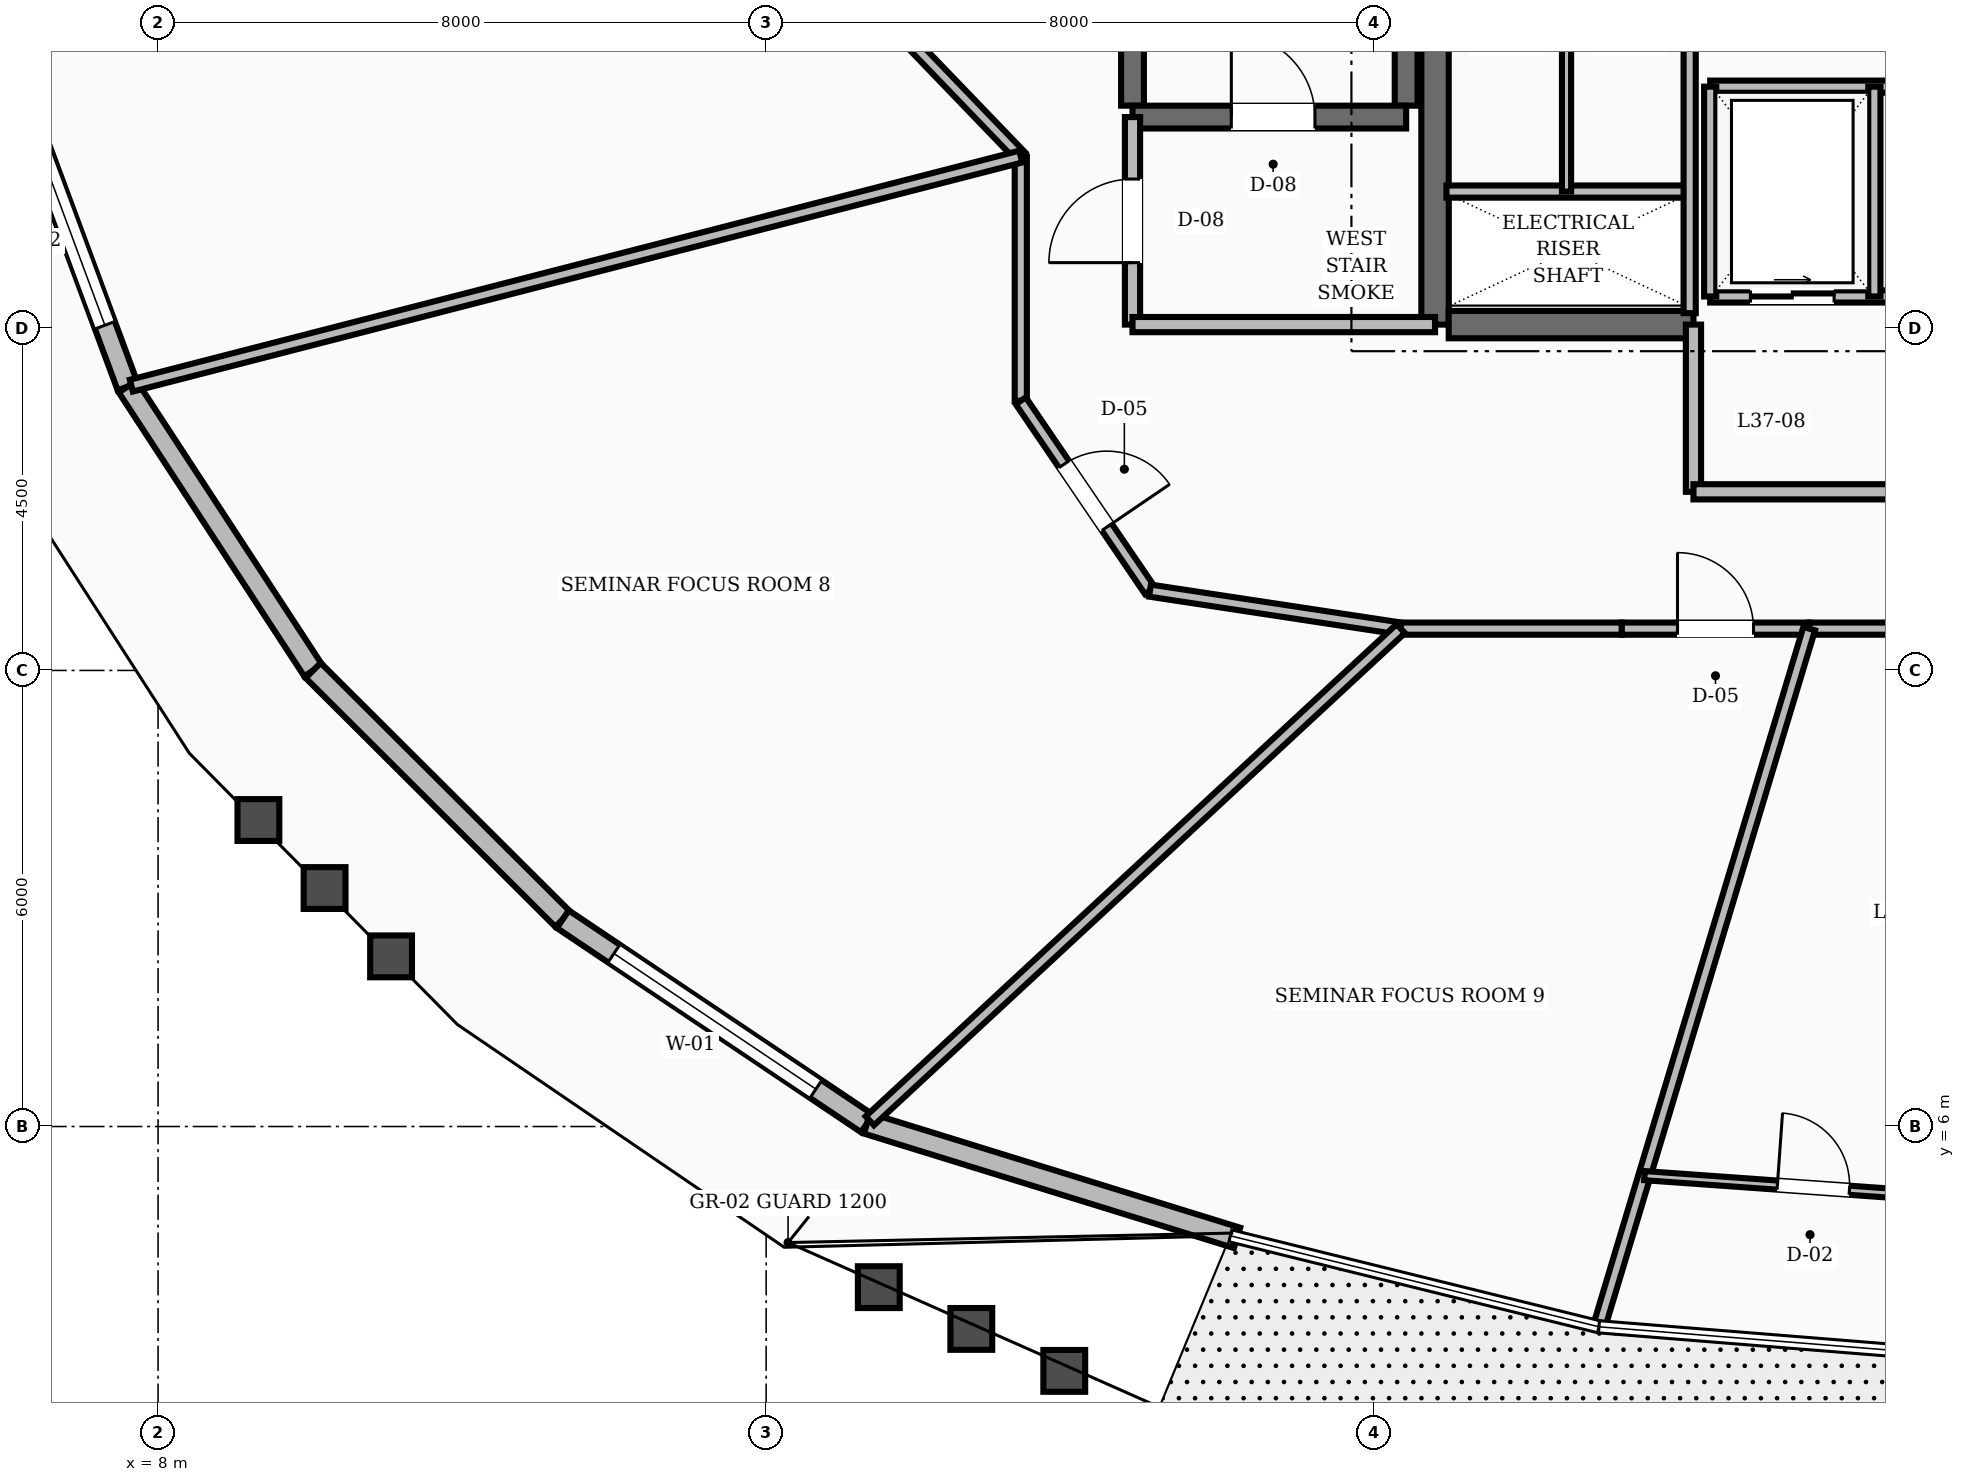
"""IFC4 building model, lengths in metres.
Left out: names, types, materials, properties, quantities, classifications, styles, units other than length and angle.
Written with IfcOpenShell. Run it as: python <this file> out.ifc"""

import sys

from ifc_helpers import new_model, si_unit, direction, frame, frame_2d, origin, place, context, subcontext, project, spatial, rectangle, extrude, element, fill, save


model = new_model("IFC4")
c1 = context("Model", 3, precision=1e-05, world=origin(), true_north=direction((0.0, 1.0)))
c2 = subcontext(c1, "Body", "Model", "MODEL_VIEW")
j1 = project(units=[si_unit("LENGTHUNIT", "METRE"), si_unit("PLANEANGLEUNIT", "RADIAN")], contexts=[c1])
p1 = place(None, origin())
s1 = spatial("IfcSite", under=j1, at=p1, CompositionType="ELEMENT")
p2 = place(p1, origin())
s2 = spatial("IfcBuilding", under=s1, at=p2, CompositionType="ELEMENT")
p3 = place(p2, frame((0.0, 0.0, 146.0)))
s3 = spatial("IfcBuildingStorey", under=s2, at=p3, CompositionType="ELEMENT", Elevation=146.0)
p4 = place(p3, frame((24.8, 16.55, 0.0), z_axis=(0.0, 0.0, 1.0), x_axis=(0.0, 1.0, 0.0)))
e1 = element("IfcWall", 1, at=p4, inside=s3, PredefinedType="SHEAR", context=c2, shape_type="SweptSolid", body=[
    extrude(rectangle(XDim=6.3, YDim=0.36, at=frame_2d((3.15, 0.0))), origin(), (0.0, 0.0, 1.0), 3.6),
])
p5 = place(p3, frame((24.98, 16.55, 0.0), z_axis=(0.0, 0.0, 1.0), x_axis=(1.0, 0.0, 0.0)))
e2 = element("IfcWall", 2, at=p5, inside=s3, PredefinedType="SHEAR", context=c2, shape_type="SweptSolid", body=[
    extrude(rectangle(XDim=3.22, YDim=0.36, at=frame_2d((1.61, 0.0))), origin(), (0.0, 0.0, 1.0), 3.6),
])
for number, where, z_axis, x_axis in (
    (3, (20.82, 19.43, 0.0), (0.0, 0.0, 1.0), (0.0, 1.0, 0.0)),
    (4, (24.42, 19.43, 0.0), (0.0, 0.0, 1.0), (0.0, 1.0, 0.0)),
):
    element("IfcWall", number, at=place(p3, frame(where, z_axis=z_axis, x_axis=x_axis)), inside=s3, PredefinedType="SHEAR", context=c2, shape_type="SweptSolid", body=[
        extrude(rectangle(XDim=8.74, YDim=0.3, at=frame_2d((4.37, 0.0))), origin(), (0.0, 0.0, 1.0), 3.6),
    ])
p6 = place(p3, frame((20.82, 19.28, 0.0), z_axis=(0.0, 0.0, 1.0), x_axis=(1.0, 0.0, 0.0)))
e5 = element("IfcWall", 5, at=p6, inside=s3, PredefinedType="SHEAR", context=c2, shape_type="SweptSolid", body=[
    extrude(rectangle(XDim=3.6, YDim=0.3, at=frame_2d((1.8, 0.0))), origin(), (0.0, 0.0, 1.0), 3.6),
])
p7 = place(p6, frame((1.3, 0.0, 0.0)))
e6 = element("IfcOpeningElement", 6, at=p7, cuts=e5, PredefinedType="OPENING", context=c2, shape_type="SweptSolid", body=[
    extrude(rectangle(XDim=1.1, YDim=2.1, at=frame_2d((0.55, 1.05))), frame((0.0, 0.16, 0.0), z_axis=(0.0, -1.0, 0.0), x_axis=(1.0, 0.0, 0.0)), (0.0, 0.0, 1.0), 0.32),
])
p8 = place(p3, frame((6.097, 19.786, 0.0), z_axis=(0.0, 0.0, 1.0), x_axis=(0.347777987911, -0.937576914778, 0.0)))
e7 = element("IfcWall", 7, at=p8, inside=s3, PredefinedType="STANDARD", context=c2, shape_type="SweptSolid", body=[
    extrude(rectangle(XDim=4.322, YDim=0.28, at=frame_2d((2.161, 0.0))), origin(), (0.0, 0.0, 1.0), 2.82),
])
p9 = place(p8, frame((0.861, 0.0, 0.8)))
e8 = element("IfcOpeningElement", 8, at=p9, cuts=e7, PredefinedType="OPENING", context=c2, shape_type="SweptSolid", body=[
    extrude(rectangle(XDim=2.6, YDim=1.65, at=frame_2d((1.3, 0.825))), frame((0.0, 0.15, 0.0), z_axis=(0.0, -1.0, 0.0), x_axis=(1.0, 0.0, 0.0)), (0.0, 0.0, 1.0), 0.3),
])
p10 = place(p3, frame((7.6, 15.734, 0.0), z_axis=(0.0, 0.0, 1.0), x_axis=(0.547087162156, -0.837075645927, 0.0)))
e9 = element("IfcWall", 9, at=p10, inside=s3, PredefinedType="STANDARD", context=c2, shape_type="SweptSolid", body=[
    extrude(rectangle(XDim=4.461, YDim=0.28, at=frame_2d((2.23, 0.0))), origin(), (0.0, 0.0, 1.0), 2.82),
])
p11 = place(p3, frame((10.041, 12.0, 0.0), z_axis=(0.0, 0.0, 1.0), x_axis=(0.708343047993, -0.70586834917, 0.0)))
e10 = element("IfcWall", 10, at=p11, inside=s3, PredefinedType="STANDARD", context=c2, shape_type="SweptSolid", body=[
    extrude(rectangle(XDim=4.637, YDim=0.28, at=frame_2d((2.318, 0.0))), origin(), (0.0, 0.0, 1.0), 2.82),
])
p12 = place(p3, frame((13.325, 8.727, 0.0), z_axis=(0.0, 0.0, 1.0), x_axis=(0.830308520581, -0.557304010977, 0.0)))
e11 = element("IfcWall", 11, at=p12, inside=s3, PredefinedType="STANDARD", context=c2, shape_type="SweptSolid", body=[
    extrude(rectangle(XDim=4.82, YDim=0.28, at=frame_2d((2.41, 0.0))), origin(), (0.0, 0.0, 1.0), 2.82),
])
p13 = place(p12, frame((0.81, 0.0, 0.8)))
e12 = element("IfcOpeningElement", 12, at=p13, cuts=e11, PredefinedType="OPENING", context=c2, shape_type="SweptSolid", body=[
    extrude(rectangle(XDim=3.2, YDim=1.65, at=frame_2d((1.6, 0.825))), frame((0.0, 0.15, 0.0), z_axis=(0.0, -1.0, 0.0), x_axis=(1.0, 0.0, 0.0)), (0.0, 0.0, 1.0), 0.3),
])
p14 = place(p3, frame((17.327, 6.041, 0.0), z_axis=(0.0, 0.0, 1.0), x_axis=(0.955338718449, -0.295512999769, 0.0)))
e13 = element("IfcWall", 13, at=p14, inside=s3, PredefinedType="STANDARD", context=c2, shape_type="SweptSolid", body=[
    extrude(rectangle(XDim=5.096, YDim=0.28, at=frame_2d((2.548, 0.0))), origin(), (0.0, 0.0, 1.0), 2.82),
])
p15 = place(p3, frame((20.82, 16.55, 0.0), z_axis=(0.0, 0.0, 1.0), x_axis=(0.0, 1.0, 0.0)))
e14 = element("IfcWall", 14, at=p15, inside=s3, PredefinedType="SOLIDWALL", context=c2, shape_type="SweptSolid", body=[
    extrude(rectangle(XDim=2.73, YDim=0.2, at=frame_2d((1.365, 0.0))), origin(), (0.0, 0.0, 1.0), 2.8),
])
p16 = place(p15, frame((0.815, 0.0, 0.0)))
e15 = element("IfcOpeningElement", 15, at=p16, cuts=e14, PredefinedType="OPENING", context=c2, shape_type="SweptSolid", body=[
    extrude(rectangle(XDim=1.1, YDim=2.1, at=frame_2d((0.55, 1.05))), frame((0.0, 0.11, 0.0), z_axis=(0.0, -1.0, 0.0), x_axis=(1.0, 0.0, 0.0)), (0.0, 0.0, 1.0), 0.22),
])
p17 = place(p3, frame((20.82, 16.55, 0.0), z_axis=(0.0, 0.0, 1.0), x_axis=(1.0, 0.0, 0.0)))
e16 = element("IfcWall", 16, at=p17, inside=s3, PredefinedType="SOLIDWALL", context=c2, shape_type="SweptSolid", body=[
    extrude(rectangle(XDim=3.98, YDim=0.2, at=frame_2d((1.99, 0.0))), origin(), (0.0, 0.0, 1.0), 2.8),
])
p18 = place(p3, frame((28.2, 14.35, 0.0), z_axis=(0.0, 0.0, 1.0), x_axis=(0.0, 1.0, 0.0)))
e17 = element("IfcWall", 17, at=p18, inside=s3, PredefinedType="SOLIDWALL", context=c2, shape_type="SweptSolid", body=[
    extrude(rectangle(XDim=2.2, YDim=0.2, at=frame_2d((1.1, 0.0))), origin(), (0.0, 0.0, 1.0), 2.8),
])
p19 = place(p3, frame((28.2, 14.35, 0.0), z_axis=(0.0, 0.0, 1.0), x_axis=(1.0, 0.0, 0.0)))
e18 = element("IfcWall", 18, at=p19, inside=s3, PredefinedType="SOLIDWALL", context=c2, shape_type="SweptSolid", body=[
    extrude(rectangle(XDim=7.6, YDim=0.2, at=frame_2d((3.8, 0.0))), origin(), (0.0, 0.0, 1.0), 2.8),
])
p20 = place(p19, frame((3.2, 0.0, 0.0)))
e19 = element("IfcOpeningElement", 19, at=p20, cuts=e18, PredefinedType="OPENING", context=c2, shape_type="SweptSolid", body=[
    extrude(rectangle(XDim=1.2, YDim=2.1, at=frame_2d((0.6, 1.05))), frame((0.0, 0.11, 0.0), z_axis=(0.0, -1.0, 0.0), x_axis=(1.0, 0.0, 0.0)), (0.0, 0.0, 1.0), 0.22),
])
p21 = place(p3, frame((28.42, 16.92, 0.0), z_axis=(0.0, 0.0, 1.0), x_axis=(1.0, 0.0, 0.0)))
e20 = element("IfcWall", 20, at=p21, inside=s3, PredefinedType="SOLIDWALL", context=c2, shape_type="SweptSolid", body=[
    extrude(rectangle(XDim=7.16, YDim=0.16, at=frame_2d((3.58, 0.0))), origin(), (0.0, 0.0, 1.0), 2.8),
])
p22 = place(p21, frame((0.53, 0.0, 0.0)))
e21 = element("IfcOpeningElement", 21, at=p22, cuts=e20, PredefinedType="OPENING", context=c2, shape_type="SweptSolid", body=[
    extrude(rectangle(XDim=1.1, YDim=2.15, at=frame_2d((0.55, 1.075))), frame((0.0, 0.09, 0.0), z_axis=(0.0, -1.0, 0.0), x_axis=(1.0, 0.0, 0.0)), (0.0, 0.0, 1.0), 0.18),
])
p23 = place(p21, frame((3.03, 0.0, 0.0)))
e22 = element("IfcOpeningElement", 22, at=p23, cuts=e20, PredefinedType="OPENING", context=c2, shape_type="SweptSolid", body=[
    extrude(rectangle(XDim=1.1, YDim=2.15, at=frame_2d((0.55, 1.075))), frame((0.0, 0.09, 0.0), z_axis=(0.0, -1.0, 0.0), x_axis=(1.0, 0.0, 0.0)), (0.0, 0.0, 1.0), 0.18),
])
p24 = place(p21, frame((5.53, 0.0, 0.0)))
e23 = element("IfcOpeningElement", 23, at=p24, cuts=e20, PredefinedType="OPENING", context=c2, shape_type="SweptSolid", body=[
    extrude(rectangle(XDim=1.1, YDim=2.15, at=frame_2d((0.55, 1.075))), frame((0.0, 0.09, 0.0), z_axis=(0.0, -1.0, 0.0), x_axis=(1.0, 0.0, 0.0)), (0.0, 0.0, 1.0), 0.18),
])
p25 = place(p3, frame((28.42, 19.68, 0.0), z_axis=(0.0, 0.0, 1.0), x_axis=(1.0, 0.0, 0.0)))
e24 = element("IfcWall", 24, at=p25, inside=s3, PredefinedType="SOLIDWALL", context=c2, shape_type="SweptSolid", body=[
    extrude(rectangle(XDim=7.16, YDim=0.16, at=frame_2d((3.58, 0.0))), origin(), (0.0, 0.0, 1.0), 2.8),
])
for number, where, z_axis, x_axis in (
    (25, (28.42, 16.92, 0.0), (0.0, 0.0, 1.0), (0.0, 1.0, 0.0)),
    (26, (30.58, 16.92, 0.0), (0.0, 0.0, 1.0), (0.0, 1.0, 0.0)),
):
    element("IfcWall", number, at=place(p3, frame(where, z_axis=z_axis, x_axis=x_axis)), inside=s3, PredefinedType="SOLIDWALL", context=c2, shape_type="SweptSolid", body=[
        extrude(rectangle(XDim=2.76, YDim=0.16, at=frame_2d((1.38, 0.0))), origin(), (0.0, 0.0, 1.0), 2.8),
    ])
p26 = place(p3, frame((24.95, 18.3, 0.0), z_axis=(0.0, 0.0, 1.0), x_axis=(1.0, 0.0, 0.0)))
e27 = element("IfcWall", 27, at=p26, inside=s3, PredefinedType="SOLIDWALL", context=c2, shape_type="SweptSolid", body=[
    extrude(rectangle(XDim=3.2, YDim=0.16, at=frame_2d((1.6, 0.0))), origin(), (0.0, 0.0, 1.0), 2.8),
])
p27 = place(p3, frame((28.15, 16.7, 0.0), z_axis=(0.0, 0.0, 1.0), x_axis=(0.0, 1.0, 0.0)))
e28 = element("IfcWall", 28, at=p27, inside=s3, PredefinedType="SOLIDWALL", context=c2, shape_type="SweptSolid", body=[
    extrude(rectangle(XDim=6.05, YDim=0.16, at=frame_2d((3.025, 0.0))), origin(), (0.0, 0.0, 1.0), 2.8),
])
p28 = place(p3, frame((26.53, 18.3, 0.0), z_axis=(0.0, 0.0, 1.0), x_axis=(0.0, 1.0, 0.0)))
e29 = element("IfcWall", 29, at=p28, inside=s3, PredefinedType="PARTITIONING", context=c2, shape_type="SweptSolid", body=[
    extrude(rectangle(XDim=4.45, YDim=0.12, at=frame_2d((2.225, 0.0))), origin(), (0.0, 0.0, 1.0), 2.8),
])
p29 = place(p3, frame((17.15, 21.046, 0.0), z_axis=(0.0, 0.0, 1.0), x_axis=(0.693473090138, -0.72048252807, 0.0)))
e30 = element("IfcWall", 30, at=p29, inside=s3, PredefinedType="SOLIDWALL", context=c2, shape_type="SweptSolid", body=[
    extrude(rectangle(XDim=3.173, YDim=0.16, at=frame_2d((1.586, 0.0))), origin(), (0.0, 0.0, 1.0), 2.8),
])
p30 = place(p3, frame((19.35, 18.76, 0.0), z_axis=(0.0, 0.0, 1.0), x_axis=(0.0, -1.0, 0.0)))
e31 = element("IfcWall", 31, at=p30, inside=s3, PredefinedType="SOLIDWALL", context=c2, shape_type="SweptSolid", body=[
    extrude(rectangle(XDim=3.213, YDim=0.16, at=frame_2d((1.606, 0.0))), origin(), (0.0, 0.0, 1.0), 2.8),
])
p31 = place(p3, frame((19.35, 15.548, 0.0), z_axis=(0.0, 0.0, 1.0), x_axis=(0.562674669208, -0.826678423955, 0.0)))
e32 = element("IfcWall", 32, at=p31, inside=s3, PredefinedType="SOLIDWALL", context=c2, shape_type="SweptSolid", body=[
    extrude(rectangle(XDim=3.021, YDim=0.16, at=frame_2d((1.511, 0.0))), origin(), (0.0, 0.0, 1.0), 2.8),
])
p32 = place(p31, frame((1.01, 0.0, 0.0)))
e33 = element("IfcOpeningElement", 33, at=p32, cuts=e32, PredefinedType="OPENING", context=c2, shape_type="SweptSolid", body=[
    extrude(rectangle(XDim=1.0, YDim=2.1, at=frame_2d((0.5, 1.05))), frame((0.0, 0.09, 0.0), z_axis=(0.0, -1.0, 0.0), x_axis=(1.0, 0.0, 0.0)), (0.0, 0.0, 1.0), 0.18),
])
p33 = place(p3, frame((21.05, 13.05, 0.0), z_axis=(0.0, 0.0, 1.0), x_axis=(0.988710906508, -0.149835721217, 0.0)))
e34 = element("IfcWall", 34, at=p33, inside=s3, PredefinedType="SOLIDWALL", context=c2, shape_type="SweptSolid", body=[
    extrude(rectangle(XDim=3.337, YDim=0.16, at=frame_2d((1.668, 0.0))), origin(), (0.0, 0.0, 1.0), 2.8),
])
p34 = place(p3, frame((24.349, 12.55, 0.0), z_axis=(0.0, 0.0, 1.0), x_axis=(1.0, 0.0, 0.0)))
e35 = element("IfcWall", 35, at=p34, inside=s3, PredefinedType="SOLIDWALL", context=c2, shape_type="SweptSolid", body=[
    extrude(rectangle(XDim=2.908, YDim=0.16, at=frame_2d((1.454, 0.0))), origin(), (0.0, 0.0, 1.0), 2.8),
])
p35 = place(p3, frame((27.257, 12.55, 0.0), z_axis=(0.0, 0.0, 1.0), x_axis=(1.0, 0.0, 0.0)))
e36 = element("IfcWall", 36, at=p35, inside=s3, PredefinedType="SOLIDWALL", context=c2, shape_type="SweptSolid", body=[
    extrude(rectangle(XDim=2.465, YDim=0.16, at=frame_2d((1.232, 0.0))), origin(), (0.0, 0.0, 1.0), 2.8),
])
p36 = place(p35, frame((0.733, 0.0, 0.0)))
e37 = element("IfcOpeningElement", 37, at=p36, cuts=e36, PredefinedType="OPENING", context=c2, shape_type="SweptSolid", body=[
    extrude(rectangle(XDim=1.0, YDim=2.1, at=frame_2d((0.5, 1.05))), frame((0.0, 0.09, 0.0), z_axis=(0.0, -1.0, 0.0), x_axis=(1.0, 0.0, 0.0)), (0.0, 0.0, 1.0), 0.18),
])
p37 = place(p3, frame((29.722, 12.55, 0.0), z_axis=(0.0, 0.0, 1.0), x_axis=(1.0, 0.0, 0.0)))
e38 = element("IfcWall", 38, at=p37, inside=s3, PredefinedType="SOLIDWALL", context=c2, shape_type="SweptSolid", body=[
    extrude(rectangle(XDim=2.278, YDim=0.16, at=frame_2d((1.139, 0.0))), origin(), (0.0, 0.0, 1.0), 2.8),
])
p38 = place(p3, frame((19.35, 18.76, 0.0), z_axis=(0.0, 0.0, 1.0), x_axis=(-0.968405713826, -0.249379978005, 0.0)))
e39 = element("IfcWall", 39, at=p38, inside=s3, PredefinedType="SOLIDWALL", context=c2, shape_type="SweptSolid", body=[
    extrude(rectangle(XDim=12.084, YDim=0.16, at=frame_2d((6.042, 0.0))), origin(), (0.0, 0.0, 1.0), 2.8),
])
p39 = place(p3, frame((24.349, 12.55, 0.0), z_axis=(0.0, 0.0, 1.0), x_axis=(-0.733383855381, -0.67981476938, 0.0)))
e40 = element("IfcWall", 40, at=p39, inside=s3, PredefinedType="SOLIDWALL", context=c2, shape_type="SweptSolid", body=[
    extrude(rectangle(XDim=9.525, YDim=0.16, at=frame_2d((4.763, 0.0))), origin(), (0.0, 0.0, 1.0), 2.8),
])
p40 = place(p3, frame((29.722, 12.55, 0.0), z_axis=(0.0, 0.0, 1.0), x_axis=(-0.28831479655, -0.9575356798, 0.0)))
e41 = element("IfcWall", 41, at=p40, inside=s3, PredefinedType="SOLIDWALL", context=c2, shape_type="SweptSolid", body=[
    extrude(rectangle(XDim=9.542, YDim=0.16, at=frame_2d((4.771, 0.0))), origin(), (0.0, 0.0, 1.0), 2.8),
])
p41 = place(p3, frame((27.556, 5.354, 0.0), z_axis=(0.0, 0.0, 1.0), x_axis=(0.997467592574, -0.071122442055, 0.0)))
e42 = element("IfcWall", 42, at=p41, inside=s3, PredefinedType="PARTITIONING", context=c2, shape_type="SweptSolid", body=[
    extrude(rectangle(XDim=4.456, YDim=0.12, at=frame_2d((2.228, 0.0))), origin(), (0.0, 0.0, 1.0), 2.8),
])
p42 = place(p41, frame((1.753, 0.0, 0.0)))
e43 = element("IfcOpeningElement", 43, at=p42, cuts=e42, PredefinedType="OPENING", context=c2, shape_type="SweptSolid", body=[
    extrude(rectangle(XDim=0.95, YDim=2.1, at=frame_2d((0.475, 1.05))), frame((0.0, 0.07, 0.0), z_axis=(0.0, -1.0, 0.0), x_axis=(1.0, 0.0, 0.0)), (0.0, 0.0, 1.0), 0.14),
])
p43 = place(p9, origin())
e44 = element("IfcWindow", 44, at=p43, inside=s3, PartitioningType="SINGLE_PANEL", PredefinedType="WINDOW", context=c2, shape_type="SweptSolid", body=[
    extrude(rectangle(XDim=2.6, YDim=1.65, at=frame_2d((1.3, 0.825))), frame((0.0, 0.03, 0.0), z_axis=(0.0, -1.0, 0.0), x_axis=(1.0, 0.0, 0.0)), (0.0, 0.0, 1.0), 0.06),
])
fill(e8, e44)
p44 = place(p13, origin())
e45 = element("IfcWindow", 45, at=p44, inside=s3, PartitioningType="SINGLE_PANEL", PredefinedType="WINDOW", context=c2, shape_type="SweptSolid", body=[
    extrude(rectangle(XDim=3.2, YDim=1.65, at=frame_2d((1.6, 0.825))), frame((0.0, 0.03, 0.0), z_axis=(0.0, -1.0, 0.0), x_axis=(1.0, 0.0, 0.0)), (0.0, 0.0, 1.0), 0.06),
])
fill(e12, e45)
p45 = place(p7, origin())
e46 = element("IfcDoor", 46, at=p45, inside=s3, OperationType="SINGLE_SWING_LEFT", PredefinedType="DOOR", context=c2, shape_type="SweptSolid", body=[
    extrude(rectangle(XDim=1.1, YDim=2.1, at=frame_2d((0.55, 1.05))), frame((0.0, 0.025, 0.0), z_axis=(0.0, -1.0, 0.0), x_axis=(1.0, 0.0, 0.0)), (0.0, 0.0, 1.0), 0.05),
])
fill(e6, e46)
p46 = place(p16, origin())
e47 = element("IfcDoor", 47, at=p46, inside=s3, OperationType="SINGLE_SWING_LEFT", PredefinedType="DOOR", context=c2, shape_type="SweptSolid", body=[
    extrude(rectangle(XDim=1.1, YDim=2.1, at=frame_2d((0.55, 1.05))), frame((0.0, 0.025, 0.0), z_axis=(0.0, -1.0, 0.0), x_axis=(1.0, 0.0, 0.0)), (0.0, 0.0, 1.0), 0.05),
])
fill(e15, e47)
p47 = place(p22, origin())
e48 = element("IfcDoor", 48, at=p47, inside=s3, OperationType="SLIDING_TO_RIGHT", PredefinedType="DOOR", context=c2, shape_type="SweptSolid", body=[
    extrude(rectangle(XDim=1.1, YDim=2.15, at=frame_2d((0.55, 1.075))), frame((0.0, 0.025, 0.0), z_axis=(0.0, -1.0, 0.0), x_axis=(1.0, 0.0, 0.0)), (0.0, 0.0, 1.0), 0.05),
])
fill(e21, e48)
p48 = place(p32, origin())
e49 = element("IfcDoor", 49, at=p48, inside=s3, OperationType="SINGLE_SWING_RIGHT", PredefinedType="DOOR", context=c2, shape_type="SweptSolid", body=[
    extrude(rectangle(XDim=1.0, YDim=2.1, at=frame_2d((0.5, 1.05))), frame((0.0, 0.025, 0.0), z_axis=(0.0, -1.0, 0.0), x_axis=(1.0, 0.0, 0.0)), (0.0, 0.0, 1.0), 0.05),
])
fill(e33, e49)
p49 = place(p36, origin())
e50 = element("IfcDoor", 50, at=p49, inside=s3, OperationType="SINGLE_SWING_LEFT", PredefinedType="DOOR", context=c2, shape_type="SweptSolid", body=[
    extrude(rectangle(XDim=1.0, YDim=2.1, at=frame_2d((0.5, 1.05))), frame((0.0, 0.025, 0.0), z_axis=(0.0, -1.0, 0.0), x_axis=(1.0, 0.0, 0.0)), (0.0, 0.0, 1.0), 0.05),
])
fill(e37, e50)
p50 = place(p42, origin())
e51 = element("IfcDoor", 51, at=p50, inside=s3, OperationType="SINGLE_SWING_LEFT", PredefinedType="DOOR", context=c2, shape_type="SweptSolid", body=[
    extrude(rectangle(XDim=0.95, YDim=2.1, at=frame_2d((0.475, 1.05))), frame((0.0, 0.025, 0.0), z_axis=(0.0, -1.0, 0.0), x_axis=(1.0, 0.0, 0.0)), (0.0, 0.0, 1.0), 0.05),
])
fill(e43, e51)
save(model, sys.argv[1])
